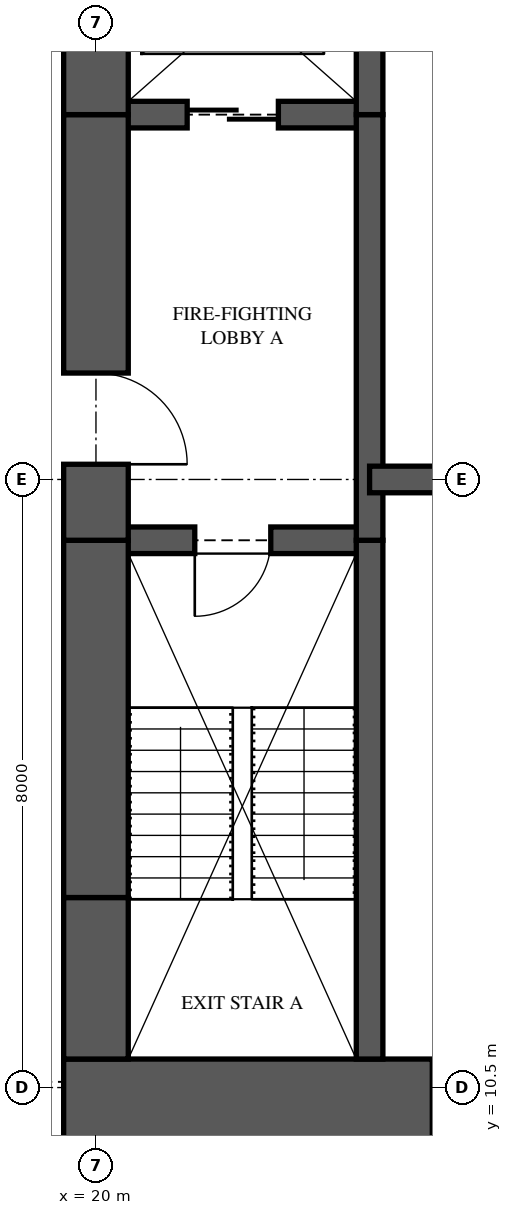
"""IFC4 building model, lengths in metres.
Left out: names, types, materials, properties, quantities, classifications, styles, units other than length and angle.
Written with IfcOpenShell. Run it as: python <this file> out.ifc"""

import sys

from ifc_helpers import new_model, si_unit, direction, frame, frame_2d, origin, place, context, subcontext, project, spatial, rectangle, extrude, element, fill, save


model = new_model("IFC4")
c1 = context("Model", 3, precision=1e-05, world=origin(), true_north=direction((0.0, 1.0)))
c2 = subcontext(c1, "Body", "Model", "MODEL_VIEW")
j1 = project(units=[si_unit("LENGTHUNIT", "METRE"), si_unit("PLANEANGLEUNIT", "RADIAN")], contexts=[c1])
p1 = place(None, origin())
s1 = spatial("IfcSite", under=j1, at=p1, CompositionType="ELEMENT")
p2 = place(p1, origin())
s2 = spatial("IfcBuilding", under=s1, at=p2, CompositionType="ELEMENT")
p3 = place(p2, frame((0.0, 0.0, 121.6)))
s3 = spatial("IfcBuildingStorey", under=s2, at=p3, CompositionType="ELEMENT", Elevation=121.6)
p4 = place(p3, frame((19.575, 10.125, 0.0), z_axis=(0.0, 0.0, 1.0), x_axis=(1.0, 0.0, 0.0)))
e1 = element("IfcWall", 1, at=p4, inside=s3, PredefinedType="SHEAR", context=c2, shape_type="SweptSolid", body=[
    extrude(rectangle(XDim=6.425, YDim=1.5, at=frame_2d((3.212, 0.0))), origin(), (0.0, 0.0, 1.0), 3.35),
])
p5 = place(p4, frame((4.85, 0.0, 0.0)))
e2 = element("IfcOpeningElement", 2, at=p5, cuts=e1, PredefinedType="OPENING", context=c2, shape_type="SweptSolid", body=[
    extrude(rectangle(XDim=0.75, YDim=2.1, at=frame_2d((0.375, 1.05))), frame((0.0, 0.76, 0.0), z_axis=(0.0, -1.0, 0.0), x_axis=(1.0, 0.0, 0.0)), (0.0, 0.0, 1.0), 1.52),
])
p6 = place(p3, frame((20.0, 26.125, 0.0), z_axis=(0.0, 0.0, 1.0), x_axis=(0.0, -1.0, 0.0)))
e3 = element("IfcWall", 3, at=p6, inside=s3, PredefinedType="SHEAR", context=c2, shape_type="SweptSolid", body=[
    extrude(rectangle(XDim=2.825, YDim=0.85, at=frame_2d((1.413, 0.0))), origin(), (0.0, 0.0, 1.0), 3.35),
])
p7 = place(p3, frame((20.0, 23.3, 0.0), z_axis=(0.0, 0.0, 1.0), x_axis=(0.0, -1.0, 0.0)))
e4 = element("IfcWall", 4, at=p7, inside=s3, PredefinedType="SHEAR", context=c2, shape_type="SweptSolid", body=[
    extrude(rectangle(XDim=5.6, YDim=0.85, at=frame_2d((2.8, 0.0))), origin(), (0.0, 0.0, 1.0), 3.35),
])
p8 = place(p7, frame((3.4, 0.0, 0.0)))
e5 = element("IfcOpeningElement", 5, at=p8, cuts=e4, PredefinedType="OPENING", context=c2, shape_type="SweptSolid", body=[
    extrude(rectangle(XDim=1.2, YDim=2.2, at=frame_2d((0.6, 1.1))), frame((0.0, 0.435, 0.0), z_axis=(0.0, -1.0, 0.0), x_axis=(1.0, 0.0, 0.0)), (0.0, 0.0, 1.0), 0.87),
])
p9 = place(p3, frame((20.0, 17.7, 0.0), z_axis=(0.0, 0.0, 1.0), x_axis=(0.0, -1.0, 0.0)))
e6 = element("IfcWall", 6, at=p9, inside=s3, PredefinedType="SHEAR", context=c2, shape_type="SweptSolid", body=[
    extrude(rectangle(XDim=4.7, YDim=0.85, at=frame_2d((2.35, 0.0))), origin(), (0.0, 0.0, 1.0), 3.35),
])
p10 = place(p3, frame((20.0, 13.0, 0.0), z_axis=(0.0, 0.0, 1.0), x_axis=(0.0, -1.0, 0.0)))
e7 = element("IfcWall", 7, at=p10, inside=s3, PredefinedType="SHEAR", context=c2, shape_type="SweptSolid", body=[
    extrude(rectangle(XDim=2.125, YDim=0.85, at=frame_2d((1.062, 0.0))), origin(), (0.0, 0.0, 1.0), 3.35),
])
p11 = place(p3, frame((23.6, 10.875, 0.0), z_axis=(0.0, 0.0, 1.0), x_axis=(0.0, 1.0, 0.0)))
e8 = element("IfcWall", 8, at=p11, inside=s3, PredefinedType="SHEAR", context=c2, shape_type="SweptSolid", body=[
    extrude(rectangle(XDim=6.825, YDim=0.35, at=frame_2d((3.413, 0.0))), origin(), (0.0, 0.0, 1.0), 3.35),
])
p12 = place(p3, frame((23.6, 17.7, 0.0), z_axis=(0.0, 0.0, 1.0), x_axis=(0.0, 1.0, 0.0)))
e9 = element("IfcWall", 9, at=p12, inside=s3, PredefinedType="SHEAR", context=c2, shape_type="SweptSolid", body=[
    extrude(rectangle(XDim=5.6, YDim=0.35, at=frame_2d((2.8, 0.0))), origin(), (0.0, 0.0, 1.0), 3.35),
])
p13 = place(p3, frame((23.6, 23.3, 0.0), z_axis=(0.0, 0.0, 1.0), x_axis=(0.0, 1.0, 0.0)))
e10 = element("IfcWall", 10, at=p13, inside=s3, PredefinedType="SHEAR", context=c2, shape_type="SweptSolid", body=[
    extrude(rectangle(XDim=2.825, YDim=0.35, at=frame_2d((1.413, 0.0))), origin(), (0.0, 0.0, 1.0), 3.35),
])
p14 = place(p3, frame((20.0, 17.7, 0.0), z_axis=(0.0, 0.0, 1.0), x_axis=(1.0, 0.0, 0.0)))
e11 = element("IfcWall", 11, at=p14, inside=s3, PredefinedType="SHEAR", context=c2, shape_type="SweptSolid", body=[
    extrude(rectangle(XDim=3.6, YDim=0.35, at=frame_2d((1.8, 0.0))), origin(), (0.0, 0.0, 1.0), 3.35),
])
p15 = place(p14, frame((1.3, 0.0, 0.0)))
e12 = element("IfcOpeningElement", 12, at=p15, cuts=e11, PredefinedType="OPENING", context=c2, shape_type="SweptSolid", body=[
    extrude(rectangle(XDim=1.0, YDim=2.1, at=frame_2d((0.5, 1.05))), frame((0.0, 0.185, 0.0), z_axis=(0.0, -1.0, 0.0), x_axis=(1.0, 0.0, 0.0)), (0.0, 0.0, 1.0), 0.37),
])
p16 = place(p3, frame((20.0, 23.3, 0.0), z_axis=(0.0, 0.0, 1.0), x_axis=(1.0, 0.0, 0.0)))
e13 = element("IfcWall", 13, at=p16, inside=s3, PredefinedType="SHEAR", context=c2, shape_type="SweptSolid", body=[
    extrude(rectangle(XDim=3.6, YDim=0.35, at=frame_2d((1.8, 0.0))), origin(), (0.0, 0.0, 1.0), 3.35),
])
p17 = place(p16, frame((1.2, 0.0, 0.0)))
e14 = element("IfcOpeningElement", 14, at=p17, cuts=e13, PredefinedType="OPENING", context=c2, shape_type="SweptSolid", body=[
    extrude(rectangle(XDim=1.2, YDim=2.1, at=frame_2d((0.6, 1.05))), frame((0.0, 0.185, 0.0), z_axis=(0.0, -1.0, 0.0), x_axis=(1.0, 0.0, 0.0)), (0.0, 0.0, 1.0), 0.37),
])
p18 = place(p3, frame((23.6, 18.5, 0.0), z_axis=(0.0, 0.0, 1.0), x_axis=(1.0, 0.0, 0.0)))
e15 = element("IfcWall", 15, at=p18, inside=s3, PredefinedType="SHEAR", context=c2, shape_type="SweptSolid", body=[
    extrude(rectangle(XDim=2.4, YDim=0.35, at=frame_2d((1.2, 0.0))), origin(), (0.0, 0.0, 1.0), 3.35),
])
p19 = place(p15, frame((1.0, 0.0, 0.0), z_axis=(0.0, 0.0, 1.0), x_axis=(-1.0, 0.0, 0.0)))
e16 = element("IfcDoor", 16, at=p19, inside=s3, OperationType="SINGLE_SWING_RIGHT", PredefinedType="DOOR", context=c2, shape_type="SweptSolid", body=[
    extrude(rectangle(XDim=1.0, YDim=2.1, at=frame_2d((0.5, 1.05))), frame((0.0, 0.025, 0.0), z_axis=(0.0, -1.0, 0.0), x_axis=(1.0, 0.0, 0.0)), (0.0, 0.0, 1.0), 0.05),
])
fill(e12, e16)
p20 = place(p8, origin())
e17 = element("IfcDoor", 17, at=p20, inside=s3, OperationType="SINGLE_SWING_RIGHT", PredefinedType="DOOR", context=c2, shape_type="SweptSolid", body=[
    extrude(rectangle(XDim=1.2, YDim=2.2, at=frame_2d((0.6, 1.1))), frame((0.0, 0.025, 0.0), z_axis=(0.0, -1.0, 0.0), x_axis=(1.0, 0.0, 0.0)), (0.0, 0.0, 1.0), 0.05),
])
fill(e5, e17)
p21 = place(p17, origin())
e18 = element("IfcDoor", 18, at=p21, inside=s3, OperationType="SLIDING_TO_LEFT", PredefinedType="DOOR", context=c2, shape_type="SweptSolid", body=[
    extrude(rectangle(XDim=1.2, YDim=2.1, at=frame_2d((0.6, 1.05))), frame((0.0, 0.025, 0.0), z_axis=(0.0, -1.0, 0.0), x_axis=(1.0, 0.0, 0.0)), (0.0, 0.0, 1.0), 0.05),
])
fill(e14, e18)
save(model, sys.argv[1])
